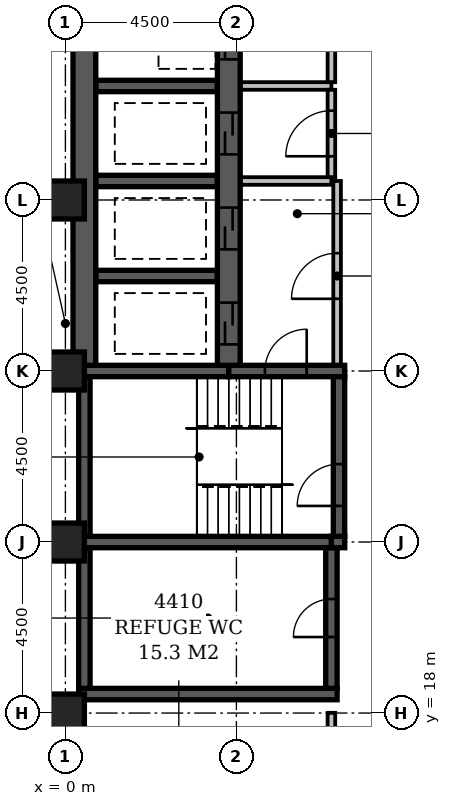
"""IFC4 building model, lengths in metres.
Left out: names, types, materials, properties, quantities, classifications, styles, units other than length and angle.
Written with IfcOpenShell. Run it as: python <this file> out.ifc"""

import sys

from ifc_helpers import new_model, si_unit, direction, frame, frame_2d, origin, origin_2d, place, context, subcontext, project, spatial, rectangle, extrude, element, fill, save


model = new_model("IFC4")
c1 = context("Model", 3, precision=1e-05, world=origin(), true_north=direction((0.0, 1.0)))
c2 = subcontext(c1, "Body", "Model", "MODEL_VIEW")
j1 = project(units=[si_unit("LENGTHUNIT", "METRE"), si_unit("PLANEANGLEUNIT", "RADIAN")], contexts=[c1])
p1 = place(None, origin())
s1 = spatial("IfcSite", under=j1, at=p1, CompositionType="ELEMENT")
p2 = place(p1, origin())
s2 = spatial("IfcBuilding", under=s1, at=p2, CompositionType="ELEMENT")
p3 = place(p2, frame((0.0, 0.0, 173.6)))
s3 = spatial("IfcBuildingStorey", under=s2, at=p3, CompositionType="ELEMENT", Elevation=173.6)
p4 = place(p3, frame((0.35, 18.5, -0.45), z_axis=(0.0, 0.0, 1.0), x_axis=(1.0, 0.0, 0.0)))
e1 = element("IfcWall", 1, at=p4, inside=s3, PredefinedType="SHEAR", context=c2, shape_type="SweptSolid", body=[
    extrude(rectangle(XDim=6.8, YDim=0.3, at=frame_2d((3.4, 0.0))), origin(), (0.0, 0.0, 1.0), 5.55),
])
p5 = place(p3, frame((0.35, 22.5, -0.45), z_axis=(0.0, 0.0, 1.0), x_axis=(1.0, 0.0, 0.0)))
e2 = element("IfcWall", 2, at=p5, inside=s3, PredefinedType="SHEAR", context=c2, shape_type="SweptSolid", body=[
    extrude(rectangle(XDim=6.65, YDim=0.3, at=frame_2d((3.325, 0.0))), origin(), (0.0, 0.0, 1.0), 5.55),
])
p6 = place(p3, frame((0.35, 27.0, -0.45), z_axis=(0.0, 0.0, 1.0), x_axis=(1.0, 0.0, 0.0)))
e3 = element("IfcWall", 3, at=p6, inside=s3, PredefinedType="SHEAR", context=c2, shape_type="SweptSolid", body=[
    extrude(rectangle(XDim=3.95, YDim=0.3, at=frame_2d((1.975, 0.0))), origin(), (0.0, 0.0, 1.0), 5.55),
])
p7 = place(p3, frame((0.5, 18.65, -0.45), z_axis=(0.0, 0.0, 1.0), x_axis=(0.0, 1.0, 0.0)))
e4 = element("IfcWall", 4, at=p7, inside=s3, PredefinedType="SHEAR", context=c2, shape_type="SweptSolid", body=[
    extrude(rectangle(XDim=3.7, YDim=0.3, at=frame_2d((1.85, 0.0))), origin(), (0.0, 0.0, 1.0), 5.55),
])
p8 = place(p3, frame((0.5, 22.65, -0.45), z_axis=(0.0, 0.0, 1.0), x_axis=(0.0, 1.0, 0.0)))
e5 = element("IfcWall", 5, at=p8, inside=s3, PredefinedType="SHEAR", context=c2, shape_type="SweptSolid", body=[
    extrude(rectangle(XDim=4.2, YDim=0.3, at=frame_2d((2.1, 0.0))), origin(), (0.0, 0.0, 1.0), 5.55),
])
p9 = place(p3, frame((0.5, 27.15, -0.45), z_axis=(0.0, 0.0, 1.0), x_axis=(0.0, 1.0, 0.0)))
e6 = element("IfcWall", 6, at=p9, inside=s3, PredefinedType="SHEAR", context=c2, shape_type="SweptSolid", body=[
    extrude(rectangle(XDim=22.05, YDim=0.6, at=frame_2d((11.025, 0.0))), origin(), (0.0, 0.0, 1.0), 5.55),
])
for number, where, z_axis, x_axis in (
    (7, (0.8, 29.5, -0.45), (0.0, 0.0, 1.0), (1.0, 0.0, 0.0)),
    (8, (0.8, 32.0, -0.45), (0.0, 0.0, 1.0), (1.0, 0.0, 0.0)),
    (9, (0.8, 34.5, -0.45), (0.0, 0.0, 1.0), (1.0, 0.0, 0.0)),
):
    element("IfcWall", number, at=place(p3, frame(where, z_axis=z_axis, x_axis=x_axis)), inside=s3, PredefinedType="SHEAR", context=c2, shape_type="SweptSolid", body=[
        extrude(rectangle(XDim=3.2, YDim=0.3, at=frame_2d((1.6, 0.0))), origin(), (0.0, 0.0, 1.0), 5.55),
    ])
p10 = place(p3, frame((4.3, 27.0, -0.45), z_axis=(0.0, 0.0, 1.0), x_axis=(1.0, 0.0, 0.0)))
e10 = element("IfcWall", 10, at=p10, inside=s3, PredefinedType="SHEAR", context=c2, shape_type="SweptSolid", body=[
    extrude(rectangle(XDim=3.05, YDim=0.3, at=frame_2d((1.525, 0.0))), origin(), (0.0, 0.0, 1.0), 5.55),
])
p11 = place(p10, frame((0.95, 0.0, 0.45)))
e11 = element("IfcOpeningElement", 11, at=p11, cuts=e10, PredefinedType="OPENING", context=c2, shape_type="SweptSolid", body=[
    extrude(rectangle(XDim=1.1, YDim=2.1, at=frame_2d((0.55, 1.05))), frame((0.0, 0.162, 0.0), z_axis=(0.0, -1.0, 0.0), x_axis=(1.0, 0.0, 0.0)), (0.0, 0.0, 1.0), 0.324),
])
p12 = place(p3, frame((4.3, 27.15, -0.45), z_axis=(0.0, 0.0, 1.0), x_axis=(0.0, 1.0, 0.0)))
e12 = element("IfcWall", 12, at=p12, inside=s3, PredefinedType="SHEAR", context=c2, shape_type="SweptSolid", body=[
    extrude(rectangle(XDim=22.05, YDim=0.6, at=frame_2d((11.025, 0.0))), origin(), (0.0, 0.0, 1.0), 5.55),
])
p13 = place(p12, frame((3.05, 0.0, 0.45)))
e13 = element("IfcOpeningElement", 13, at=p13, cuts=e12, PredefinedType="OPENING", context=c2, shape_type="SweptSolid", body=[
    extrude(rectangle(XDim=1.1, YDim=2.1, at=frame_2d((0.55, 1.05))), frame((0.0, 0.312, 0.0), z_axis=(0.0, -1.0, 0.0), x_axis=(1.0, 0.0, 0.0)), (0.0, 0.0, 1.0), 0.624),
])
p14 = place(p12, frame((0.55, 0.0, 0.45)))
e14 = element("IfcOpeningElement", 14, at=p14, cuts=e12, PredefinedType="OPENING", context=c2, shape_type="SweptSolid", body=[
    extrude(rectangle(XDim=1.1, YDim=2.1, at=frame_2d((0.55, 1.05))), frame((0.0, 0.312, 0.0), z_axis=(0.0, -1.0, 0.0), x_axis=(1.0, 0.0, 0.0)), (0.0, 0.0, 1.0), 0.624),
])
p15 = place(p12, frame((20.55, 0.0, 0.45)))
e15 = element("IfcOpeningElement", 15, at=p15, cuts=e12, PredefinedType="OPENING", context=c2, shape_type="SweptSolid", body=[
    extrude(rectangle(XDim=1.1, YDim=2.1, at=frame_2d((0.55, 1.05))), frame((0.0, 0.312, 0.0), z_axis=(0.0, -1.0, 0.0), x_axis=(1.0, 0.0, 0.0)), (0.0, 0.0, 1.0), 0.624),
])
p16 = place(p12, frame((18.05, 0.0, 0.45)))
e16 = element("IfcOpeningElement", 16, at=p16, cuts=e12, PredefinedType="OPENING", context=c2, shape_type="SweptSolid", body=[
    extrude(rectangle(XDim=1.1, YDim=2.1, at=frame_2d((0.55, 1.05))), frame((0.0, 0.312, 0.0), z_axis=(0.0, -1.0, 0.0), x_axis=(1.0, 0.0, 0.0)), (0.0, 0.0, 1.0), 0.624),
])
p17 = place(p12, frame((15.55, 0.0, 0.45)))
e17 = element("IfcOpeningElement", 17, at=p17, cuts=e12, PredefinedType="OPENING", context=c2, shape_type="SweptSolid", body=[
    extrude(rectangle(XDim=1.1, YDim=2.1, at=frame_2d((0.55, 1.05))), frame((0.0, 0.312, 0.0), z_axis=(0.0, -1.0, 0.0), x_axis=(1.0, 0.0, 0.0)), (0.0, 0.0, 1.0), 0.624),
])
p18 = place(p12, frame((13.05, 0.0, 0.45)))
e18 = element("IfcOpeningElement", 18, at=p18, cuts=e12, PredefinedType="OPENING", context=c2, shape_type="SweptSolid", body=[
    extrude(rectangle(XDim=1.1, YDim=2.1, at=frame_2d((0.55, 1.05))), frame((0.0, 0.312, 0.0), z_axis=(0.0, -1.0, 0.0), x_axis=(1.0, 0.0, 0.0)), (0.0, 0.0, 1.0), 0.624),
])
p19 = place(p12, frame((10.55, 0.0, 0.45)))
e19 = element("IfcOpeningElement", 19, at=p19, cuts=e12, PredefinedType="OPENING", context=c2, shape_type="SweptSolid", body=[
    extrude(rectangle(XDim=1.1, YDim=2.1, at=frame_2d((0.55, 1.05))), frame((0.0, 0.312, 0.0), z_axis=(0.0, -1.0, 0.0), x_axis=(1.0, 0.0, 0.0)), (0.0, 0.0, 1.0), 0.624),
])
p20 = place(p12, frame((8.05, 0.0, 0.45)))
e20 = element("IfcOpeningElement", 20, at=p20, cuts=e12, PredefinedType="OPENING", context=c2, shape_type="SweptSolid", body=[
    extrude(rectangle(XDim=1.1, YDim=2.1, at=frame_2d((0.55, 1.05))), frame((0.0, 0.312, 0.0), z_axis=(0.0, -1.0, 0.0), x_axis=(1.0, 0.0, 0.0)), (0.0, 0.0, 1.0), 0.624),
])
p21 = place(p12, frame((5.55, 0.0, 0.45)))
e21 = element("IfcOpeningElement", 21, at=p21, cuts=e12, PredefinedType="OPENING", context=c2, shape_type="SweptSolid", body=[
    extrude(rectangle(XDim=1.1, YDim=2.1, at=frame_2d((0.55, 1.05))), frame((0.0, 0.312, 0.0), z_axis=(0.0, -1.0, 0.0), x_axis=(1.0, 0.0, 0.0)), (0.0, 0.0, 1.0), 0.624),
])
p22 = place(p3, frame((7.0, 18.65, -0.45), z_axis=(0.0, 0.0, 1.0), x_axis=(0.0, 1.0, 0.0)))
e22 = element("IfcWall", 22, at=p22, inside=s3, PredefinedType="SHEAR", context=c2, shape_type="SweptSolid", body=[
    extrude(rectangle(XDim=3.7, YDim=0.3, at=frame_2d((1.85, 0.0))), origin(), (0.0, 0.0, 1.0), 5.55),
])
p23 = place(p22, frame((1.35, 0.0, 0.45)))
e23 = element("IfcOpeningElement", 23, at=p23, cuts=e22, PredefinedType="OPENING", context=c2, shape_type="SweptSolid", body=[
    extrude(rectangle(XDim=1.0, YDim=2.1, at=frame_2d((0.5, 1.05))), frame((0.0, 0.162, 0.0), z_axis=(0.0, -1.0, 0.0), x_axis=(1.0, 0.0, 0.0)), (0.0, 0.0, 1.0), 0.324),
])
p24 = place(p3, frame((7.0, 22.5, -0.45), z_axis=(0.0, 0.0, 1.0), x_axis=(1.0, 0.0, 0.0)))
e24 = element("IfcWall", 24, at=p24, inside=s3, PredefinedType="SHEAR", context=c2, shape_type="SweptSolid", body=[
    extrude(rectangle(XDim=0.35, YDim=0.3, at=frame_2d((0.175, 0.0))), origin(), (0.0, 0.0, 1.0), 5.55),
])
p25 = place(p3, frame((7.2, 22.65, -0.45), z_axis=(0.0, 0.0, 1.0), x_axis=(0.0, 1.0, 0.0)))
e25 = element("IfcWall", 25, at=p25, inside=s3, PredefinedType="SHEAR", context=c2, shape_type="SweptSolid", body=[
    extrude(rectangle(XDim=4.2, YDim=0.3, at=frame_2d((2.1, 0.0))), origin(), (0.0, 0.0, 1.0), 5.55),
])
p26 = place(p25, frame((0.8, 0.0, 0.45)))
e26 = element("IfcOpeningElement", 26, at=p26, cuts=e25, PredefinedType="OPENING", context=c2, shape_type="SweptSolid", body=[
    extrude(rectangle(XDim=1.1, YDim=2.1, at=frame_2d((0.55, 1.05))), frame((0.0, 0.162, 0.0), z_axis=(0.0, -1.0, 0.0), x_axis=(1.0, 0.0, 0.0)), (0.0, 0.0, 1.0), 0.324),
])
for number, where, z_axis, x_axis in (
    (27, (0.0, 18.0, -0.45), (0.0, 0.0, 1.0), (1.0, 0.0, 0.0)),
    (28, (0.0, 22.5, -0.45), (0.0, 0.0, 1.0), (1.0, 0.0, 0.0)),
    (29, (0.0, 27.0, -0.45), (0.0, 0.0, 1.0), (1.0, 0.0, 0.0)),
    (30, (0.0, 31.5, -0.45), (0.0, 0.0, 1.0), (1.0, 0.0, 0.0)),
):
    element("IfcColumn", number, at=place(p3, frame(where, z_axis=z_axis, x_axis=x_axis)), inside=s3, PredefinedType="COLUMN", context=c2, shape_type="SweptSolid", body=[
        extrude(rectangle(XDim=1.0, YDim=1.0, at=origin_2d()), origin(), (0.0, 0.0, 1.0), 5.55),
    ])
p27 = place(p3, frame((4.62, 34.5, 0.0), z_axis=(0.0, 0.0, 1.0), x_axis=(1.0, 0.0, 0.0)))
e31 = element("IfcWall", 31, at=p27, inside=s3, PredefinedType="PARTITIONING", context=c2, shape_type="SweptSolid", body=[
    extrude(rectangle(XDim=2.38, YDim=0.2, at=frame_2d((1.19, 0.0))), origin(), (0.0, 0.0, 1.0), 5.1),
])
p28 = place(p3, frame((7.0, 34.6, 0.0), z_axis=(0.0, 0.0, 1.0), x_axis=(0.0, 1.0, 0.0)))
e32 = element("IfcWall", 32, at=p28, inside=s3, PredefinedType="PARTITIONING", context=c2, shape_type="SweptSolid", body=[
    extrude(rectangle(XDim=14.9, YDim=0.2, at=frame_2d((7.45, 0.0))), origin(), (0.0, 0.0, 1.0), 5.1),
])
p29 = place(p28, frame((2.8, 0.0, 0.0)))
e33 = element("IfcOpeningElement", 33, at=p29, cuts=e32, PredefinedType="OPENING", context=c2, shape_type="SweptSolid", body=[
    extrude(rectangle(XDim=1.2, YDim=2.1, at=frame_2d((0.6, 1.05))), frame((0.0, 0.112, 0.0), z_axis=(0.0, -1.0, 0.0), x_axis=(1.0, 0.0, 0.0)), (0.0, 0.0, 1.0), 0.224),
])
p30 = place(p28, frame((9.8, 0.0, 0.0)))
e34 = element("IfcOpeningElement", 34, at=p30, cuts=e32, PredefinedType="OPENING", context=c2, shape_type="SweptSolid", body=[
    extrude(rectangle(XDim=1.2, YDim=2.1, at=frame_2d((0.6, 1.05))), frame((0.0, 0.112, 0.0), z_axis=(0.0, -1.0, 0.0), x_axis=(1.0, 0.0, 0.0)), (0.0, 0.0, 1.0), 0.224),
])
p31 = place(p3, frame((4.62, 32.0, 0.0), z_axis=(0.0, 0.0, 1.0), x_axis=(1.0, 0.0, 0.0)))
e35 = element("IfcWall", 35, at=p31, inside=s3, PredefinedType="PARTITIONING", context=c2, shape_type="SweptSolid", body=[
    extrude(rectangle(XDim=2.38, YDim=0.2, at=frame_2d((1.19, 0.0))), origin(), (0.0, 0.0, 1.0), 5.1),
])
p32 = place(p3, frame((7.0, 32.1, 0.0), z_axis=(0.0, 0.0, 1.0), x_axis=(0.0, 1.0, 0.0)))
e36 = element("IfcWall", 36, at=p32, inside=s3, PredefinedType="PARTITIONING", context=c2, shape_type="SweptSolid", body=[
    extrude(rectangle(XDim=2.3, YDim=0.2, at=frame_2d((1.15, 0.0))), origin(), (0.0, 0.0, 1.0), 5.1),
])
p33 = place(p32, frame((0.55, 0.0, 0.0)))
e37 = element("IfcOpeningElement", 37, at=p33, cuts=e36, PredefinedType="OPENING", context=c2, shape_type="SweptSolid", body=[
    extrude(rectangle(XDim=1.2, YDim=2.1, at=frame_2d((0.6, 1.05))), frame((0.0, 0.112, 0.0), z_axis=(0.0, -1.0, 0.0), x_axis=(1.0, 0.0, 0.0)), (0.0, 0.0, 1.0), 0.224),
])
p34 = place(p3, frame((7.15, 27.17, 0.0), z_axis=(0.0, 0.0, 1.0), x_axis=(0.0, 1.0, 0.0)))
e38 = element("IfcWall", 38, at=p34, inside=s3, PredefinedType="PARTITIONING", context=c2, shape_type="SweptSolid", body=[
    extrude(rectangle(XDim=4.83, YDim=0.2, at=frame_2d((2.415, 0.0))), origin(), (0.0, 0.0, 1.0), 5.1),
])
p35 = place(p34, frame((1.73, 0.0, 0.0)))
e39 = element("IfcOpeningElement", 39, at=p35, cuts=e38, PredefinedType="OPENING", context=c2, shape_type="SweptSolid", body=[
    extrude(rectangle(XDim=1.2, YDim=2.1, at=frame_2d((0.6, 1.05))), frame((0.0, 0.112, 0.0), z_axis=(0.0, -1.0, 0.0), x_axis=(1.0, 0.0, 0.0)), (0.0, 0.0, 1.0), 0.224),
])
p36 = place(p3, frame((7.0, 18.006, 0.0), z_axis=(0.0, 0.0, 1.0), x_axis=(0.0, -1.0, 0.0)))
e40 = element("IfcWall", 40, at=p36, inside=s3, PredefinedType="PARTITIONING", context=c2, shape_type="SweptSolid", body=[
    extrude(rectangle(XDim=1.756, YDim=0.2, at=frame_2d((0.878, 0.0))), origin(), (0.0, 0.0, 1.0), 5.1),
])
p37 = place(p36, frame((0.503, 0.0, 0.0)))
e41 = element("IfcOpeningElement", 41, at=p37, cuts=e40, PredefinedType="OPENING", context=c2, shape_type="SweptSolid", body=[
    extrude(rectangle(XDim=0.8, YDim=2.1, at=frame_2d((0.4, 1.05))), frame((0.0, 0.112, 0.0), z_axis=(0.0, -1.0, 0.0), x_axis=(1.0, 0.0, 0.0)), (0.0, 0.0, 1.0), 0.224),
])
p38 = place(p35, origin())
e42 = element("IfcDoor", 42, at=p38, inside=s3, OperationType="SINGLE_SWING_LEFT", PredefinedType="DOOR", context=c2, shape_type="SweptSolid", body=[
    extrude(rectangle(XDim=1.2, YDim=2.1, at=frame_2d((0.6, 1.05))), frame((0.0, 0.025, 0.0), z_axis=(0.0, -1.0, 0.0), x_axis=(1.0, 0.0, 0.0)), (0.0, 0.0, 1.0), 0.05),
])
fill(e39, e42)
p39 = place(p13, origin())
e43 = element("IfcDoor", 43, at=p39, inside=s3, OperationType="SLIDING_TO_LEFT", PredefinedType="DOOR", context=c2, shape_type="SweptSolid", body=[
    extrude(rectangle(XDim=1.1, YDim=2.1, at=frame_2d((0.55, 1.05))), frame((0.0, 0.025, 0.0), z_axis=(0.0, -1.0, 0.0), x_axis=(1.0, 0.0, 0.0)), (0.0, 0.0, 1.0), 0.05),
])
fill(e13, e43)
p40 = place(p14, origin())
e44 = element("IfcDoor", 44, at=p40, inside=s3, OperationType="SLIDING_TO_LEFT", PredefinedType="DOOR", context=c2, shape_type="SweptSolid", body=[
    extrude(rectangle(XDim=1.1, YDim=2.1, at=frame_2d((0.55, 1.05))), frame((0.0, 0.025, 0.0), z_axis=(0.0, -1.0, 0.0), x_axis=(1.0, 0.0, 0.0)), (0.0, 0.0, 1.0), 0.05),
])
fill(e14, e44)
p41 = place(p20, origin())
e45 = element("IfcDoor", 45, at=p41, inside=s3, OperationType="SLIDING_TO_LEFT", PredefinedType="DOOR", context=c2, shape_type="SweptSolid", body=[
    extrude(rectangle(XDim=1.1, YDim=2.1, at=frame_2d((0.55, 1.05))), frame((0.0, 0.025, 0.0), z_axis=(0.0, -1.0, 0.0), x_axis=(1.0, 0.0, 0.0)), (0.0, 0.0, 1.0), 0.05),
])
fill(e20, e45)
p42 = place(p33, origin())
e46 = element("IfcDoor", 46, at=p42, inside=s3, OperationType="SINGLE_SWING_LEFT", PredefinedType="DOOR", context=c2, shape_type="SweptSolid", body=[
    extrude(rectangle(XDim=1.2, YDim=2.1, at=frame_2d((0.6, 1.05))), frame((0.0, 0.025, 0.0), z_axis=(0.0, -1.0, 0.0), x_axis=(1.0, 0.0, 0.0)), (0.0, 0.0, 1.0), 0.05),
])
fill(e37, e46)
p43 = place(p21, origin())
e47 = element("IfcDoor", 47, at=p43, inside=s3, OperationType="SLIDING_TO_LEFT", PredefinedType="DOOR", context=c2, shape_type="SweptSolid", body=[
    extrude(rectangle(XDim=1.1, YDim=2.1, at=frame_2d((0.55, 1.05))), frame((0.0, 0.025, 0.0), z_axis=(0.0, -1.0, 0.0), x_axis=(1.0, 0.0, 0.0)), (0.0, 0.0, 1.0), 0.05),
])
fill(e21, e47)
p44 = place(p23, origin())
e48 = element("IfcDoor", 48, at=p44, inside=s3, OperationType="SINGLE_SWING_LEFT", PredefinedType="DOOR", context=c2, shape_type="SweptSolid", body=[
    extrude(rectangle(XDim=1.0, YDim=2.1, at=frame_2d((0.5, 1.05))), frame((0.0, 0.025, 0.0), z_axis=(0.0, -1.0, 0.0), x_axis=(1.0, 0.0, 0.0)), (0.0, 0.0, 1.0), 0.05),
])
fill(e23, e48)
p45 = place(p11, frame((1.1, 0.0, 0.0), z_axis=(0.0, 0.0, 1.0), x_axis=(-1.0, 0.0, 0.0)))
e49 = element("IfcDoor", 49, at=p45, inside=s3, OperationType="SINGLE_SWING_LEFT", PredefinedType="DOOR", context=c2, shape_type="SweptSolid", body=[
    extrude(rectangle(XDim=1.1, YDim=2.1, at=frame_2d((0.55, 1.05))), frame((0.0, 0.025, 0.0), z_axis=(0.0, -1.0, 0.0), x_axis=(1.0, 0.0, 0.0)), (0.0, 0.0, 1.0), 0.05),
])
fill(e11, e49)
p46 = place(p26, origin())
e50 = element("IfcDoor", 50, at=p46, inside=s3, OperationType="SINGLE_SWING_LEFT", PredefinedType="DOOR", context=c2, shape_type="SweptSolid", body=[
    extrude(rectangle(XDim=1.1, YDim=2.1, at=frame_2d((0.55, 1.05))), frame((0.0, 0.025, 0.0), z_axis=(0.0, -1.0, 0.0), x_axis=(1.0, 0.0, 0.0)), (0.0, 0.0, 1.0), 0.05),
])
fill(e26, e50)
save(model, sys.argv[1])
